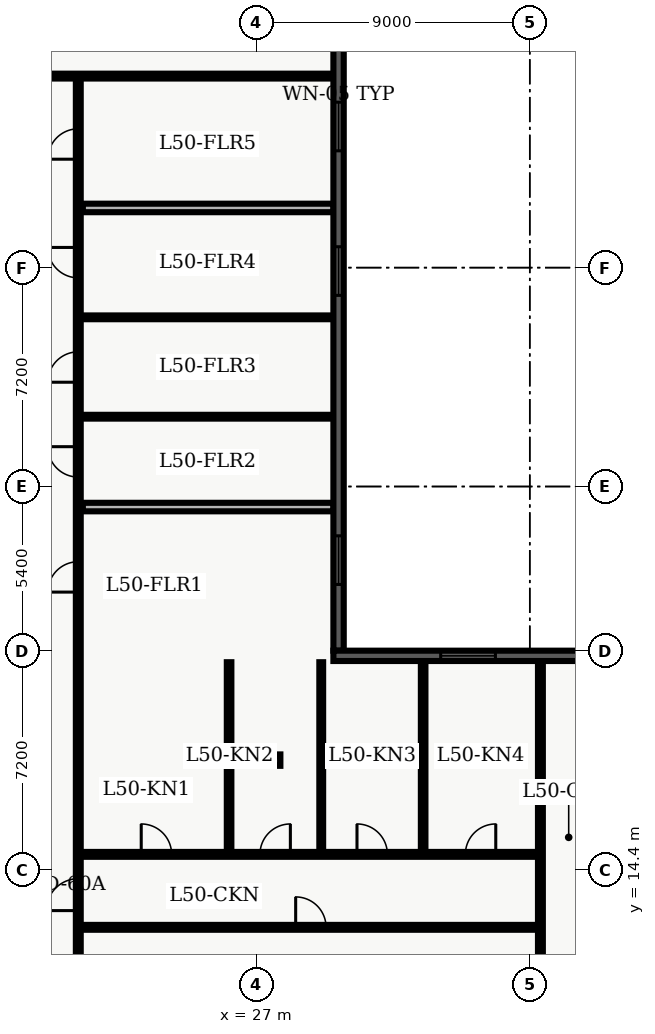
"""IFC4 building model, lengths in metres.
Left out: names, types, materials, properties, quantities, classifications, styles, units other than length and angle.
Written with IfcOpenShell. Run it as: python <this file> out.ifc"""

import sys

from ifc_helpers import new_model, entity, si_unit, converted_unit, direction, frame, origin_with_axes, origin_2d_with_axis, place, context, subcontext, project, spatial, polyline, rectangle, i_section, outline, extrude, element, fill, save


model = new_model("IFC4")
c1 = context("Model", 3, precision=1e-05, world=origin_with_axes(), true_north=direction((0.0, 1.0)))
c2 = subcontext(c1, "Body", "Model", "MODEL_VIEW")
j1 = project(units=[si_unit("LENGTHUNIT", "METRE"), converted_unit("PLANEANGLEUNIT", "DEGREE", entity("IfcPlaneAngleMeasure", 0.017), si_unit("PLANEANGLEUNIT", "RADIAN"), dimensions=[0, 0, 0, 0, 0, 0, 0])], contexts=[c1])
p1 = place(None, origin_with_axes())
s1 = spatial("IfcSite", under=j1, at=p1, CompositionType="ELEMENT")
p2 = place(p1, origin_with_axes())
s2 = spatial("IfcBuilding", under=s1, at=p2, CompositionType="ELEMENT")
p3 = place(p2, frame((0.0, 0.0, 204.3), z_axis=(0.0, 0.0, 1.0), x_axis=(1.0, 0.0, 0.0)))
s3 = spatial("IfcBuildingStorey", under=s2, at=p3, CompositionType="ELEMENT", Elevation=204.3)
p4 = place(p3, frame((27.6, 18.0, 0.0), z_axis=(0.0, 0.0, 1.0), x_axis=(1.0, 0.0, 0.0)))
e1 = element("IfcColumn", 1, at=p4, inside=s3, PredefinedType="COLUMN", context=c2, shape_type="SweptSolid", body=[
    extrude(i_section(OverallWidth=0.394, OverallDepth=0.375, WebThickness=0.017, FlangeThickness=0.028, FilletRadius=0.02, at=origin_2d_with_axis()), origin_with_axes(), (0.0, 0.0, 1.0), 3.9),
])
p5 = place(p3, frame((2.6, 40.5, 0.0), z_axis=(0.0, 0.0, 1.0), x_axis=(1.0, 0.0, 0.0)))
e2 = element("IfcWall", 2, at=p5, inside=s3, PredefinedType="PARTITIONING", context=c2, shape_type="SweptSolid", body=[
    extrude(outline(polyline([(0.0, -0.08), (26.946, -0.08), (26.946, 0.08), (0.0, 0.08), (0.0, -0.08)])), origin_with_axes(), (0.0, 0.0, 1.0), 2.7),
])
p6 = place(p5, frame((1.768, 0.0, 0.0), z_axis=(0.0, 0.0, 1.0), x_axis=(1.0, 0.0, 0.0)))
e3 = element("IfcOpeningElement", 3, at=p6, cuts=e2, PredefinedType="OPENING", context=c2, shape_type="SweptSolid", body=[
    extrude(rectangle(XDim=1.0, YDim=0.18, at=origin_2d_with_axis()), origin_with_axes(), (0.0, 0.0, 1.0), 2.15),
])
p7 = place(p5, frame((7.824, 0.0, 0.0), z_axis=(0.0, 0.0, 1.0), x_axis=(1.0, 0.0, 0.0)))
e4 = element("IfcOpeningElement", 4, at=p7, cuts=e2, PredefinedType="OPENING", context=c2, shape_type="SweptSolid", body=[
    extrude(rectangle(XDim=1.0, YDim=0.18, at=origin_2d_with_axis()), origin_with_axes(), (0.0, 0.0, 1.0), 2.15),
])
p8 = place(p5, frame((10.411, 0.0, 0.0), z_axis=(0.0, 0.0, 1.0), x_axis=(1.0, 0.0, 0.0)))
e5 = element("IfcOpeningElement", 5, at=p8, cuts=e2, PredefinedType="OPENING", context=c2, shape_type="SweptSolid", body=[
    extrude(rectangle(XDim=1.0, YDim=0.18, at=origin_2d_with_axis()), origin_with_axes(), (0.0, 0.0, 1.0), 2.15),
])
p9 = place(p5, frame((14.771, 0.0, 0.0), z_axis=(0.0, 0.0, 1.0), x_axis=(1.0, 0.0, 0.0)))
e6 = element("IfcOpeningElement", 6, at=p9, cuts=e2, PredefinedType="OPENING", context=c2, shape_type="SweptSolid", body=[
    extrude(rectangle(XDim=1.0, YDim=0.18, at=origin_2d_with_axis()), origin_with_axes(), (0.0, 0.0, 1.0), 2.15),
])
p10 = place(p3, frame((21.15, 7.8, 0.0), z_axis=(0.0, 0.0, 1.0), x_axis=(0.0, 1.0, 0.0)))
e7 = element("IfcWall", 7, at=p10, inside=s3, PredefinedType="PARTITIONING", context=c2, shape_type="SweptSolid", body=[
    extrude(outline(polyline([(0.0, -0.08), (32.7, -0.08), (32.7, 0.08), (0.0, 0.08), (0.0, -0.08)])), origin_with_axes(), (0.0, 0.0, 1.0), 2.7),
])
p11 = place(p10, frame((16.227, 0.0, 0.0), z_axis=(0.0, 0.0, 1.0), x_axis=(1.0, 0.0, 0.0)))
e8 = element("IfcOpeningElement", 8, at=p11, cuts=e7, PredefinedType="OPENING", context=c2, shape_type="SweptSolid", body=[
    extrude(rectangle(XDim=1.0, YDim=0.18, at=origin_2d_with_axis()), origin_with_axes(), (0.0, 0.0, 1.0), 2.15),
])
p12 = place(p10, frame((20.01, 0.0, 0.0), z_axis=(0.0, 0.0, 1.0), x_axis=(1.0, 0.0, 0.0)))
e9 = element("IfcOpeningElement", 9, at=p12, cuts=e7, PredefinedType="OPENING", context=c2, shape_type="SweptSolid", body=[
    extrude(rectangle(XDim=1.0, YDim=0.18, at=origin_2d_with_axis()), origin_with_axes(), (0.0, 0.0, 1.0), 2.15),
])
p13 = place(p10, frame((23.131, 0.0, 0.0), z_axis=(0.0, 0.0, 1.0), x_axis=(1.0, 0.0, 0.0)))
e10 = element("IfcOpeningElement", 10, at=p13, cuts=e7, PredefinedType="OPENING", context=c2, shape_type="SweptSolid", body=[
    extrude(rectangle(XDim=1.0, YDim=0.18, at=origin_2d_with_axis()), origin_with_axes(), (0.0, 0.0, 1.0), 2.15),
])
p14 = place(p10, frame((26.564, 0.0, 0.0), z_axis=(0.0, 0.0, 1.0), x_axis=(1.0, 0.0, 0.0)))
e11 = element("IfcOpeningElement", 11, at=p14, cuts=e7, PredefinedType="OPENING", context=c2, shape_type="SweptSolid", body=[
    extrude(rectangle(XDim=1.0, YDim=0.18, at=origin_2d_with_axis()), origin_with_axes(), (0.0, 0.0, 1.0), 2.15),
])
p15 = place(p10, frame((30.466, 0.0, 0.0), z_axis=(0.0, 0.0, 1.0), x_axis=(1.0, 0.0, 0.0)))
e12 = element("IfcOpeningElement", 12, at=p15, cuts=e7, PredefinedType="OPENING", context=c2, shape_type="SweptSolid", body=[
    extrude(rectangle(XDim=1.0, YDim=0.18, at=origin_2d_with_axis()), origin_with_axes(), (0.0, 0.0, 1.0), 2.15),
])
p16 = place(p10, frame((5.775, 0.0, 0.0), z_axis=(0.0, 0.0, 1.0), x_axis=(1.0, 0.0, 0.0)))
e13 = element("IfcOpeningElement", 13, at=p16, cuts=e7, PredefinedType="OPENING", context=c2, shape_type="SweptSolid", body=[
    extrude(rectangle(XDim=1.05, YDim=0.18, at=origin_2d_with_axis()), origin_with_axes(), (0.0, 0.0, 1.0), 2.15),
])
p17 = place(p3, frame((21.3, 26.324, 0.0), z_axis=(0.0, 0.0, 1.0), x_axis=(1.0, 0.0, 0.0)))
e14 = element("IfcWall", 14, at=p17, inside=s3, PredefinedType="PARTITIONING", context=c2, shape_type="SweptSolid", body=[
    extrude(outline(polyline([(0.0, -0.14), (8.246, -0.14), (8.246, 0.14), (0.0, 0.14), (0.0, -0.14)])), origin_with_axes(), (0.0, 0.0, 1.0), 2.7),
])
for number, where, z_axis, x_axis in (
    (15, (21.3, 29.296, 0.0), (0.0, 0.0, 1.0), (1.0, 0.0, 0.0)),
    (16, (21.3, 32.565, 0.0), (0.0, 0.0, 1.0), (1.0, 0.0, 0.0)),
):
    element("IfcWall", number, at=place(p3, frame(where, z_axis=z_axis, x_axis=x_axis)), inside=s3, PredefinedType="PARTITIONING", context=c2, shape_type="SweptSolid", body=[
        extrude(outline(polyline([(0.0, -0.062), (8.246, -0.062), (8.246, 0.062), (0.0, 0.062), (0.0, -0.062)])), origin_with_axes(), (0.0, 0.0, 1.0), 2.7),
    ])
p18 = place(p3, frame((21.3, 36.163, 0.0), z_axis=(0.0, 0.0, 1.0), x_axis=(1.0, 0.0, 0.0)))
e17 = element("IfcWall", 17, at=p18, inside=s3, PredefinedType="PARTITIONING", context=c2, shape_type="SweptSolid", body=[
    extrude(outline(polyline([(0.0, -0.14), (8.246, -0.14), (8.246, 0.14), (0.0, 0.14), (0.0, -0.14)])), origin_with_axes(), (0.0, 0.0, 1.0), 2.7),
])
p19 = place(p3, frame((21.15, 12.5, 0.0), z_axis=(0.0, 0.0, 1.0), x_axis=(1.0, 0.0, 0.0)))
e18 = element("IfcWall", 18, at=p19, inside=s3, PredefinedType="PARTITIONING", context=c2, shape_type="SweptSolid", body=[
    extrude(outline(polyline([(0.0, -0.08), (15.2, -0.08), (15.2, 0.08), (0.0, 0.08), (0.0, -0.08)])), origin_with_axes(), (0.0, 0.0, 1.0), 2.7),
])
p20 = place(p19, frame((7.65, 0.0, 0.0), z_axis=(0.0, 0.0, 1.0), x_axis=(1.0, 0.0, 0.0)))
e19 = element("IfcOpeningElement", 19, at=p20, cuts=e18, PredefinedType="OPENING", context=c2, shape_type="SweptSolid", body=[
    extrude(rectangle(XDim=1.0, YDim=0.18, at=origin_2d_with_axis()), origin_with_axes(), (0.0, 0.0, 1.0), 2.15),
])
p21 = place(p3, frame((21.15, 14.9, 0.0), z_axis=(0.0, 0.0, 1.0), x_axis=(1.0, 0.0, 0.0)))
e20 = element("IfcWall", 20, at=p21, inside=s3, PredefinedType="PARTITIONING", context=c2, shape_type="SweptSolid", body=[
    extrude(outline(polyline([(0.0, -0.08), (15.2, -0.08), (15.2, 0.08), (0.0, 0.08), (0.0, -0.08)])), origin_with_axes(), (0.0, 0.0, 1.0), 2.7),
])
p22 = place(p21, frame((2.57, 0.0, 0.0), z_axis=(0.0, 0.0, 1.0), x_axis=(1.0, 0.0, 0.0)))
e21 = element("IfcOpeningElement", 21, at=p22, cuts=e20, PredefinedType="OPENING", context=c2, shape_type="SweptSolid", body=[
    extrude(rectangle(XDim=1.0, YDim=0.18, at=origin_2d_with_axis()), origin_with_axes(), (0.0, 0.0, 1.0), 2.15),
])
p23 = place(p21, frame((6.476, 0.0, 0.0), z_axis=(0.0, 0.0, 1.0), x_axis=(1.0, 0.0, 0.0)))
e22 = element("IfcOpeningElement", 22, at=p23, cuts=e20, PredefinedType="OPENING", context=c2, shape_type="SweptSolid", body=[
    extrude(rectangle(XDim=1.0, YDim=0.18, at=origin_2d_with_axis()), origin_with_axes(), (0.0, 0.0, 1.0), 2.15),
])
p24 = place(p21, frame((9.667, 0.0, 0.0), z_axis=(0.0, 0.0, 1.0), x_axis=(1.0, 0.0, 0.0)))
e23 = element("IfcOpeningElement", 23, at=p24, cuts=e20, PredefinedType="OPENING", context=c2, shape_type="SweptSolid", body=[
    extrude(rectangle(XDim=1.0, YDim=0.18, at=origin_2d_with_axis()), origin_with_axes(), (0.0, 0.0, 1.0), 2.15),
])
p25 = place(p21, frame((13.232, 0.0, 0.0), z_axis=(0.0, 0.0, 1.0), x_axis=(1.0, 0.0, 0.0)))
e24 = element("IfcOpeningElement", 24, at=p25, cuts=e20, PredefinedType="OPENING", context=c2, shape_type="SweptSolid", body=[
    extrude(rectangle(XDim=1.0, YDim=0.18, at=origin_2d_with_axis()), origin_with_axes(), (0.0, 0.0, 1.0), 2.15),
])
p26 = place(p3, frame((36.35, 4.35, 0.0), z_axis=(0.0, 0.0, 1.0), x_axis=(0.0, 1.0, 0.0)))
e25 = element("IfcWall", 25, at=p26, inside=s3, PredefinedType="PARTITIONING", context=c2, shape_type="SweptSolid", body=[
    extrude(outline(polyline([(0.0, -0.08), (16.95, -0.08), (16.95, 0.08), (0.0, 0.08), (0.0, -0.08)])), origin_with_axes(), (0.0, 0.0, 1.0), 2.7),
])
p27 = place(p3, frame((26.11, 15.02, 0.0), z_axis=(0.0, 0.0, 1.0), x_axis=(0.0, 1.0, 0.0)))
e26 = element("IfcWall", 26, at=p27, inside=s3, PredefinedType="PARTITIONING", context=c2, shape_type="SweptSolid", body=[
    extrude(outline(polyline([(0.0, -0.075), (6.2, -0.075), (6.2, 0.075), (0.0, 0.075), (0.0, -0.075)])), origin_with_axes(), (0.0, 0.0, 1.0), 2.7),
])
p28 = place(p3, frame((29.141, 15.02, 0.0), z_axis=(0.0, 0.0, 1.0), x_axis=(0.0, 1.0, 0.0)))
e27 = element("IfcWall", 27, at=p28, inside=s3, PredefinedType="PARTITIONING", context=c2, shape_type="SweptSolid", body=[
    extrude(outline(polyline([(0.0, -0.062), (6.2, -0.062), (6.2, 0.062), (0.0, 0.062), (0.0, -0.062)])), origin_with_axes(), (0.0, 0.0, 1.0), 2.7),
])
p29 = place(p3, frame((32.493, 15.02, 0.0), z_axis=(0.0, 0.0, 1.0), x_axis=(0.0, 1.0, 0.0)))
e28 = element("IfcWall", 28, at=p29, inside=s3, PredefinedType="PARTITIONING", context=c2, shape_type="SweptSolid", body=[
    extrude(outline(polyline([(0.0, -0.075), (6.245, -0.075), (6.245, 0.075), (0.0, 0.075), (0.0, -0.075)])), origin_with_axes(), (0.0, 0.0, 1.0), 2.7),
])
p30 = place(p3, frame((29.711, 41.82, 0.0), z_axis=(0.0, 0.0, 1.0), x_axis=(0.0, -1.0, 0.0)))
e29 = element("IfcWall", 29, at=p30, inside=s3, PredefinedType="SOLIDWALL", context=c2, shape_type="SweptSolid", body=[
    extrude(outline(polyline([(0.0, -0.17), (20.22, -0.17), (20.22, 0.17), (0.0, 0.17), (0.0, -0.17)])), origin_with_axes(), (0.0, 0.0, 1.0), 3.66),
])
p31 = place(p30, frame((2.978, 0.0, 0.45), z_axis=(0.0, 0.0, 1.0), x_axis=(1.0, 0.0, 0.0)))
e30 = element("IfcOpeningElement", 30, at=p31, cuts=e29, PredefinedType="OPENING", context=c2, shape_type="SweptSolid", body=[
    extrude(rectangle(XDim=1.6, YDim=0.36, at=origin_2d_with_axis()), origin_with_axes(), (0.0, 0.0, 1.0), 2.2),
])
p32 = place(p30, frame((7.733, 0.0, 0.45), z_axis=(0.0, 0.0, 1.0), x_axis=(1.0, 0.0, 0.0)))
e31 = element("IfcOpeningElement", 31, at=p32, cuts=e29, PredefinedType="OPENING", context=c2, shape_type="SweptSolid", body=[
    extrude(rectangle(XDim=1.6, YDim=0.36, at=origin_2d_with_axis()), origin_with_axes(), (0.0, 0.0, 1.0), 2.2),
])
p33 = place(p30, frame((17.242, 0.0, 0.45), z_axis=(0.0, 0.0, 1.0), x_axis=(1.0, 0.0, 0.0)))
e32 = element("IfcOpeningElement", 32, at=p33, cuts=e29, PredefinedType="OPENING", context=c2, shape_type="SweptSolid", body=[
    extrude(rectangle(XDim=1.6, YDim=0.36, at=origin_2d_with_axis()), origin_with_axes(), (0.0, 0.0, 1.0), 2.2),
])
p34 = place(p3, frame((29.541, 21.43, 0.0), z_axis=(0.0, 0.0, 1.0), x_axis=(1.0, 0.0, 0.0)))
e33 = element("IfcWall", 33, at=p34, inside=s3, PredefinedType="SOLIDWALL", context=c2, shape_type="SweptSolid", body=[
    extrude(outline(polyline([(0.0, -0.17), (8.859, -0.17), (8.859, 0.17), (0.0, 0.17), (0.0, -0.17)])), origin_with_axes(), (0.0, 0.0, 1.0), 3.66),
])
p35 = place(p34, frame((4.429, 0.0, 0.45), z_axis=(0.0, 0.0, 1.0), x_axis=(1.0, 0.0, 0.0)))
e34 = element("IfcOpeningElement", 34, at=p35, cuts=e33, PredefinedType="OPENING", context=c2, shape_type="SweptSolid", body=[
    extrude(rectangle(XDim=1.8, YDim=0.36, at=origin_2d_with_axis()), origin_with_axes(), (0.0, 0.0, 1.0), 2.1),
])
p36 = place(p10, frame((16.227, 0.0, 0.0), z_axis=(0.0, 0.0, 1.0), x_axis=(1.0, 0.0, 0.0)))
e35 = element("IfcDoor", 35, at=p36, inside=s3, OperationType="SINGLE_SWING_LEFT", PredefinedType="DOOR", context=c2, shape_type="SweptSolid", body=[
    extrude(rectangle(XDim=1.0, YDim=0.09, at=origin_2d_with_axis()), origin_with_axes(), (0.0, 0.0, 1.0), 2.15),
])
fill(e8, e35)
p37 = place(p10, frame((20.01, 0.0, 0.0), z_axis=(0.0, 0.0, 1.0), x_axis=(1.0, 0.0, 0.0)))
e36 = element("IfcDoor", 36, at=p37, inside=s3, OperationType="SINGLE_SWING_RIGHT", PredefinedType="DOOR", context=c2, shape_type="SweptSolid", body=[
    extrude(rectangle(XDim=1.0, YDim=0.09, at=origin_2d_with_axis()), origin_with_axes(), (0.0, 0.0, 1.0), 2.15),
])
fill(e9, e36)
p38 = place(p10, frame((23.131, 0.0, 0.0), z_axis=(0.0, 0.0, 1.0), x_axis=(1.0, 0.0, 0.0)))
e37 = element("IfcDoor", 37, at=p38, inside=s3, OperationType="SINGLE_SWING_LEFT", PredefinedType="DOOR", context=c2, shape_type="SweptSolid", body=[
    extrude(rectangle(XDim=1.0, YDim=0.09, at=origin_2d_with_axis()), origin_with_axes(), (0.0, 0.0, 1.0), 2.15),
])
fill(e10, e37)
p39 = place(p10, frame((26.564, 0.0, 0.0), z_axis=(0.0, 0.0, 1.0), x_axis=(1.0, 0.0, 0.0)))
e38 = element("IfcDoor", 38, at=p39, inside=s3, OperationType="SINGLE_SWING_RIGHT", PredefinedType="DOOR", context=c2, shape_type="SweptSolid", body=[
    extrude(rectangle(XDim=1.0, YDim=0.09, at=origin_2d_with_axis()), origin_with_axes(), (0.0, 0.0, 1.0), 2.15),
])
fill(e11, e38)
p40 = place(p10, frame((30.466, 0.0, 0.0), z_axis=(0.0, 0.0, 1.0), x_axis=(1.0, 0.0, 0.0)))
e39 = element("IfcDoor", 39, at=p40, inside=s3, OperationType="SINGLE_SWING_LEFT", PredefinedType="DOOR", context=c2, shape_type="SweptSolid", body=[
    extrude(rectangle(XDim=1.0, YDim=0.09, at=origin_2d_with_axis()), origin_with_axes(), (0.0, 0.0, 1.0), 2.15),
])
fill(e12, e39)
p41 = place(p10, frame((5.775, 0.0, 0.0), z_axis=(0.0, 0.0, 1.0), x_axis=(1.0, 0.0, 0.0)))
e40 = element("IfcDoor", 40, at=p41, inside=s3, OperationType="SINGLE_SWING_LEFT", PredefinedType="DOOR", context=c2, shape_type="SweptSolid", body=[
    extrude(rectangle(XDim=1.05, YDim=0.09, at=origin_2d_with_axis()), origin_with_axes(), (0.0, 0.0, 1.0), 2.15),
])
fill(e13, e40)
p42 = place(p19, frame((7.65, 0.0, 0.0), z_axis=(0.0, 0.0, 1.0), x_axis=(1.0, 0.0, 0.0)))
e41 = element("IfcDoor", 41, at=p42, inside=s3, OperationType="SINGLE_SWING_LEFT", PredefinedType="DOOR", context=c2, shape_type="SweptSolid", body=[
    extrude(rectangle(XDim=1.0, YDim=0.09, at=origin_2d_with_axis()), origin_with_axes(), (0.0, 0.0, 1.0), 2.15),
])
fill(e19, e41)
p43 = place(p21, frame((2.57, 0.0, 0.0), z_axis=(0.0, 0.0, 1.0), x_axis=(1.0, 0.0, 0.0)))
e42 = element("IfcDoor", 42, at=p43, inside=s3, OperationType="SINGLE_SWING_LEFT", PredefinedType="DOOR", context=c2, shape_type="SweptSolid", body=[
    extrude(rectangle(XDim=1.0, YDim=0.09, at=origin_2d_with_axis()), origin_with_axes(), (0.0, 0.0, 1.0), 2.15),
])
fill(e21, e42)
p44 = place(p21, frame((6.476, 0.0, 0.0), z_axis=(0.0, 0.0, 1.0), x_axis=(1.0, 0.0, 0.0)))
e43 = element("IfcDoor", 43, at=p44, inside=s3, OperationType="SINGLE_SWING_RIGHT", PredefinedType="DOOR", context=c2, shape_type="SweptSolid", body=[
    extrude(rectangle(XDim=1.0, YDim=0.09, at=origin_2d_with_axis()), origin_with_axes(), (0.0, 0.0, 1.0), 2.15),
])
fill(e22, e43)
p45 = place(p21, frame((9.667, 0.0, 0.0), z_axis=(0.0, 0.0, 1.0), x_axis=(1.0, 0.0, 0.0)))
e44 = element("IfcDoor", 44, at=p45, inside=s3, OperationType="SINGLE_SWING_LEFT", PredefinedType="DOOR", context=c2, shape_type="SweptSolid", body=[
    extrude(rectangle(XDim=1.0, YDim=0.09, at=origin_2d_with_axis()), origin_with_axes(), (0.0, 0.0, 1.0), 2.15),
])
fill(e23, e44)
p46 = place(p21, frame((13.232, 0.0, 0.0), z_axis=(0.0, 0.0, 1.0), x_axis=(1.0, 0.0, 0.0)))
e45 = element("IfcDoor", 45, at=p46, inside=s3, OperationType="SINGLE_SWING_RIGHT", PredefinedType="DOOR", context=c2, shape_type="SweptSolid", body=[
    extrude(rectangle(XDim=1.0, YDim=0.09, at=origin_2d_with_axis()), origin_with_axes(), (0.0, 0.0, 1.0), 2.15),
])
fill(e24, e45)
p47 = place(p30, frame((2.978, 0.0, 0.45), z_axis=(0.0, 0.0, 1.0), x_axis=(1.0, 0.0, 0.0)))
e46 = element("IfcWindow", 46, at=p47, inside=s3, PredefinedType="WINDOW", context=c2, shape_type="SweptSolid", body=[
    extrude(rectangle(XDim=1.6, YDim=0.09, at=origin_2d_with_axis()), origin_with_axes(), (0.0, 0.0, 1.0), 2.2),
])
fill(e30, e46)
p48 = place(p30, frame((7.733, 0.0, 0.45), z_axis=(0.0, 0.0, 1.0), x_axis=(1.0, 0.0, 0.0)))
e47 = element("IfcWindow", 47, at=p48, inside=s3, PredefinedType="WINDOW", context=c2, shape_type="SweptSolid", body=[
    extrude(rectangle(XDim=1.6, YDim=0.09, at=origin_2d_with_axis()), origin_with_axes(), (0.0, 0.0, 1.0), 2.2),
])
fill(e31, e47)
p49 = place(p30, frame((17.242, 0.0, 0.45), z_axis=(0.0, 0.0, 1.0), x_axis=(1.0, 0.0, 0.0)))
e48 = element("IfcWindow", 48, at=p49, inside=s3, PredefinedType="WINDOW", context=c2, shape_type="SweptSolid", body=[
    extrude(rectangle(XDim=1.6, YDim=0.09, at=origin_2d_with_axis()), origin_with_axes(), (0.0, 0.0, 1.0), 2.2),
])
fill(e32, e48)
p50 = place(p34, frame((4.429, 0.0, 0.45), z_axis=(0.0, 0.0, 1.0), x_axis=(1.0, 0.0, 0.0)))
e49 = element("IfcWindow", 49, at=p50, inside=s3, PredefinedType="WINDOW", context=c2, shape_type="SweptSolid", body=[
    extrude(rectangle(XDim=1.8, YDim=0.09, at=origin_2d_with_axis()), origin_with_axes(), (0.0, 0.0, 1.0), 2.1),
])
fill(e34, e49)
save(model, sys.argv[1])
